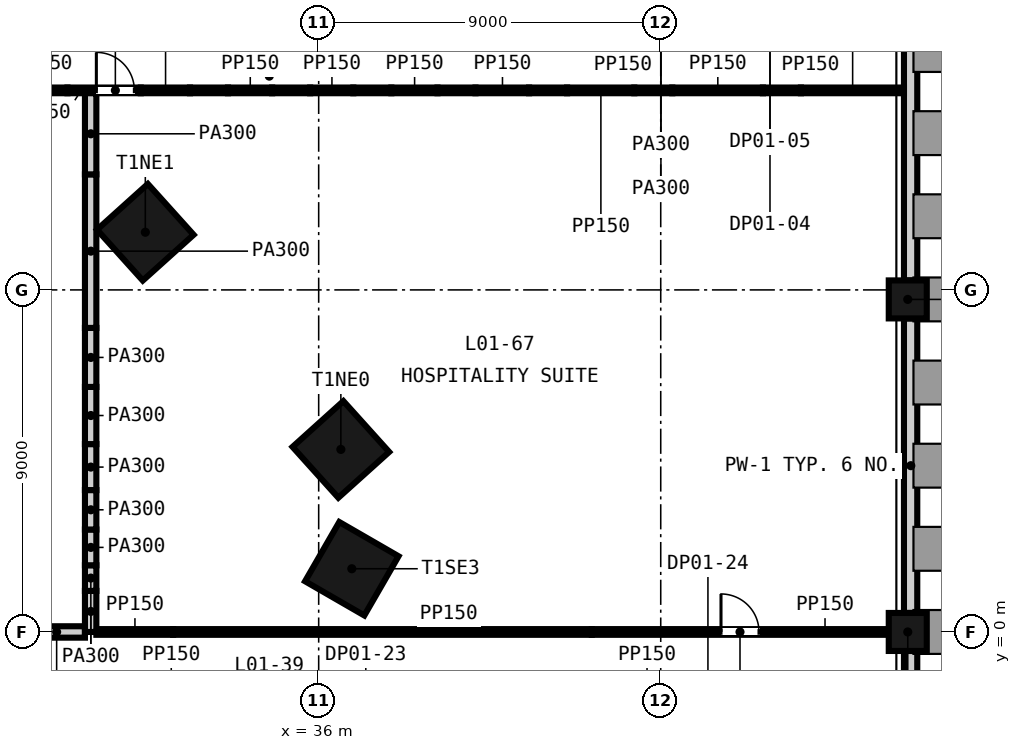
"""IFC4 building model, lengths in metres.
Left out: names, types, materials, properties, quantities, classifications, styles, units other than length and angle.
Written with IfcOpenShell. Run it as: python <this file> out.ifc"""

import sys

from ifc_helpers import new_model, si_unit, direction, frame, frame_2d, origin, origin_2d, place, context, subcontext, project, spatial, rectangle, extrude, element, fill, save


model = new_model("IFC4")
c1 = context("Model", 3, precision=1e-05, world=origin(), true_north=direction((0.0, 1.0)))
c2 = subcontext(c1, "Body", "Model", "MODEL_VIEW")
j1 = project(units=[si_unit("LENGTHUNIT", "METRE"), si_unit("PLANEANGLEUNIT", "RADIAN")], contexts=[c1])
p1 = place(None, origin())
s1 = spatial("IfcSite", under=j1, at=p1, CompositionType="ELEMENT")
p2 = place(p1, origin())
s2 = spatial("IfcBuilding", under=s1, at=p2, CompositionType="ELEMENT")
p3 = place(p2, frame((0.0, 0.0, 9.0)))
s3 = spatial("IfcBuildingStorey", under=s2, at=p3, CompositionType="ELEMENT", Elevation=9.0)
for number, where, z_axis, x_axis in (
    (1, (36.872, 1.663, -0.4), (0.0, 0.0, 1.0), (0.5, 0.866, 0.0)),
    (2, (36.584, 4.803, -0.4), (0.0, 0.0, 1.0), (-0.669, 0.743, 0.0)),
    (3, (31.438, 10.517, -0.4), (0.0, 0.0, 1.0), (-0.669, 0.743, 0.0)),
):
    element("IfcColumn", number, at=place(p3, frame(where, z_axis=z_axis, x_axis=x_axis)), inside=s3, PredefinedType="COLUMN", context=c2, shape_type="SweptSolid", body=[
        extrude(rectangle(XDim=1.8, YDim=1.8, at=origin_2d()), origin(), (0.0, 0.0, 1.0), 9.0),
    ])
for number, where, z_axis, x_axis in (
    (4, (51.5, 0.0, -0.4), (0.0, 0.0, 1.0), (0.0, 1.0, 0.0)),
    (5, (51.5, 8.75, -0.4), (0.0, 0.0, 1.0), (0.0, 1.0, 0.0)),
):
    element("IfcColumn", number, at=place(p3, frame(where, z_axis=z_axis, x_axis=x_axis)), inside=s3, PredefinedType="COLUMN", context=c2, shape_type="SweptSolid", body=[
        extrude(rectangle(XDim=1.0, YDim=1.0, at=origin_2d()), origin(), (0.0, 0.0, 1.0), 9.0),
    ])
p4 = place(p3, frame((51.575, -8.2, -0.4), z_axis=(0.0, 0.0, 1.0), x_axis=(0.0, 1.0, 0.0)))
e6 = element("IfcWall", 6, at=p4, inside=s3, PredefinedType="SOLIDWALL", context=c2, shape_type="SweptSolid", body=[
    extrude(rectangle(XDim=7.7, YDim=0.35, at=frame_2d((3.85, 0.0))), origin(), (0.0, 0.0, 1.0), 8.1),
])
for number, where, z_axis, x_axis in (
    (7, (51.575, 0.5, -0.4), (0.0, 0.0, 1.0), (0.0, 1.0, 0.0)),
    (8, (51.575, 9.25, -0.4), (0.0, 0.0, 1.0), (0.0, 1.0, 0.0)),
):
    element("IfcWall", number, at=place(p3, frame(where, z_axis=z_axis, x_axis=x_axis)), inside=s3, PredefinedType="SOLIDWALL", context=c2, shape_type="SweptSolid", body=[
        extrude(rectangle(XDim=7.75, YDim=0.35, at=frame_2d((3.875, 0.0))), origin(), (0.0, 0.0, 1.0), 8.1),
    ])
p5 = place(p3, frame((24.5, 0.0, 0.0), z_axis=(0.0, 0.0, 1.0), x_axis=(1.0, 0.0, 0.0)))
e9 = element("IfcWall", 9, at=p5, inside=s3, PredefinedType="PARTITIONING", context=c2, shape_type="SweptSolid", body=[
    extrude(rectangle(XDim=5.35, YDim=0.3, at=frame_2d((2.675, 0.0))), origin(), (0.0, 0.0, 1.0), 8.6),
])
p6 = place(p5, frame((1.4, 0.0, 0.0)))
e10 = element("IfcOpeningElement", 10, at=p6, cuts=e9, PredefinedType="OPENING", context=c2, shape_type="SweptSolid", body=[
    extrude(rectangle(XDim=2.4, YDim=2.4, at=frame_2d((1.2, 1.2))), frame((0.0, 0.16, 0.0), z_axis=(0.0, -1.0, 0.0), x_axis=(1.0, 0.0, 0.0)), (0.0, 0.0, 1.0), 0.32),
])
p7 = place(p3, frame((30.15, 0.0, 0.0), z_axis=(0.0, 0.0, 1.0), x_axis=(1.0, 0.0, 0.0)))
e11 = element("IfcWall", 11, at=p7, inside=s3, PredefinedType="PARTITIONING", context=c2, shape_type="SweptSolid", body=[
    extrude(rectangle(XDim=2.021, YDim=0.15, at=frame_2d((1.01, 0.0))), origin(), (0.0, 0.0, 1.0), 8.6),
])
p8 = place(p3, frame((32.171, 0.0, 0.0), z_axis=(0.0, 0.0, 1.0), x_axis=(1.0, 0.0, 0.0)))
e12 = element("IfcWall", 12, at=p8, inside=s3, PredefinedType="PARTITIONING", context=c2, shape_type="SweptSolid", body=[
    extrude(rectangle(XDim=11.015, YDim=0.15, at=frame_2d((5.508, 0.0))), origin(), (0.0, 0.0, 1.0), 7.6),
])
p9 = place(p3, frame((43.186, 0.0, 0.0), z_axis=(0.0, 0.0, 1.0), x_axis=(1.0, 0.0, 0.0)))
e13 = element("IfcWall", 13, at=p9, inside=s3, PredefinedType="PARTITIONING", context=c2, shape_type="SweptSolid", body=[
    extrude(rectangle(XDim=7.814, YDim=0.15, at=frame_2d((3.907, 0.0))), origin(), (0.0, 0.0, 1.0), 8.6),
])
p10 = place(p9, frame((3.4, 0.0, 0.0)))
e14 = element("IfcOpeningElement", 14, at=p10, cuts=e13, PredefinedType="OPENING", context=c2, shape_type="SweptSolid", body=[
    extrude(rectangle(XDim=1.0, YDim=2.1, at=frame_2d((0.5, 1.05))), frame((0.0, 0.085, 0.0), z_axis=(0.0, -1.0, 0.0), x_axis=(1.0, 0.0, 0.0)), (0.0, 0.0, 1.0), 0.17),
])
p11 = place(p3, frame((28.111, 14.25, 0.0), z_axis=(0.0, 0.0, 1.0), x_axis=(1.0, 0.0, 0.0)))
e15 = element("IfcWall", 15, at=p11, inside=s3, PredefinedType="PARTITIONING", context=c2, shape_type="SweptSolid", body=[
    extrude(rectangle(XDim=1.278, YDim=0.15, at=frame_2d((0.639, 0.0))), origin(), (0.0, 0.0, 1.0), 7.6),
])
p12 = place(p3, frame((29.389, 14.25, 0.0), z_axis=(0.0, 0.0, 1.0), x_axis=(1.0, 0.0, 0.0)))
e16 = element("IfcWall", 16, at=p12, inside=s3, PredefinedType="PARTITIONING", context=c2, shape_type="SweptSolid", body=[
    extrude(rectangle(XDim=1.929, YDim=0.15, at=frame_2d((0.965, 0.0))), origin(), (0.0, 0.0, 1.0), 7.511),
])
p13 = place(p12, frame((0.76, 0.0, 0.0)))
e17 = element("IfcOpeningElement", 17, at=p13, cuts=e16, PredefinedType="OPENING", context=c2, shape_type="SweptSolid", body=[
    extrude(rectangle(XDim=1.0, YDim=2.1, at=frame_2d((0.5, 1.05))), frame((0.0, 0.085, 0.0), z_axis=(0.0, -1.0, 0.0), x_axis=(1.0, 0.0, 0.0)), (0.0, 0.0, 1.0), 0.17),
])
p14 = place(p3, frame((31.319, 14.25, 0.0), z_axis=(0.0, 0.0, 1.0), x_axis=(1.0, 0.0, 0.0)))
e18 = element("IfcWall", 18, at=p14, inside=s3, PredefinedType="PARTITIONING", context=c2, shape_type="SweptSolid", body=[
    extrude(rectangle(XDim=1.295, YDim=0.15, at=frame_2d((0.648, 0.0))), origin(), (0.0, 0.0, 1.0), 8.6),
])
p15 = place(p3, frame((32.614, 14.25, 0.0), z_axis=(0.0, 0.0, 1.0), x_axis=(1.0, 0.0, 0.0)))
e19 = element("IfcWall", 19, at=p15, inside=s3, PredefinedType="PARTITIONING", context=c2, shape_type="SweptSolid", body=[
    extrude(rectangle(XDim=1.0, YDim=0.15, at=frame_2d((0.5, 0.0))), origin(), (0.0, 0.0, 1.0), 7.511),
])
p16 = place(p3, frame((33.614, 14.25, 0.0), z_axis=(0.0, 0.0, 1.0), x_axis=(1.0, 0.0, 0.0)))
e20 = element("IfcWall", 20, at=p16, inside=s3, PredefinedType="PARTITIONING", context=c2, shape_type="SweptSolid", body=[
    extrude(rectangle(XDim=1.162, YDim=0.15, at=frame_2d((0.581, 0.0))), origin(), (0.0, 0.0, 1.0), 8.6),
])
p17 = place(p3, frame((34.776, 14.25, 0.0), z_axis=(0.0, 0.0, 1.0), x_axis=(1.0, 0.0, 0.0)))
e21 = element("IfcWall", 21, at=p17, inside=s3, PredefinedType="PARTITIONING", context=c2, shape_type="SweptSolid", body=[
    extrude(rectangle(XDim=1.0, YDim=0.15, at=frame_2d((0.5, 0.0))), origin(), (0.0, 0.0, 1.0), 7.511),
])
p18 = place(p3, frame((35.776, 14.25, 0.0), z_axis=(0.0, 0.0, 1.0), x_axis=(1.0, 0.0, 0.0)))
e22 = element("IfcWall", 22, at=p18, inside=s3, PredefinedType="PARTITIONING", context=c2, shape_type="SweptSolid", body=[
    extrude(rectangle(XDim=1.136, YDim=0.15, at=frame_2d((0.568, 0.0))), origin(), (0.0, 0.0, 1.0), 8.6),
])
p19 = place(p3, frame((36.912, 14.25, 0.0), z_axis=(0.0, 0.0, 1.0), x_axis=(1.0, 0.0, 0.0)))
e23 = element("IfcWall", 23, at=p19, inside=s3, PredefinedType="PARTITIONING", context=c2, shape_type="SweptSolid", body=[
    extrude(rectangle(XDim=1.0, YDim=0.15, at=frame_2d((0.5, 0.0))), origin(), (0.0, 0.0, 1.0), 7.511),
])
p20 = place(p3, frame((37.912, 14.25, 0.0), z_axis=(0.0, 0.0, 1.0), x_axis=(1.0, 0.0, 0.0)))
e24 = element("IfcWall", 24, at=p20, inside=s3, PredefinedType="PARTITIONING", context=c2, shape_type="SweptSolid", body=[
    extrude(rectangle(XDim=1.214, YDim=0.15, at=frame_2d((0.607, 0.0))), origin(), (0.0, 0.0, 1.0), 8.6),
])
p21 = place(p3, frame((39.126, 14.25, 0.0), z_axis=(0.0, 0.0, 1.0), x_axis=(1.0, 0.0, 0.0)))
e25 = element("IfcWall", 25, at=p21, inside=s3, PredefinedType="PARTITIONING", context=c2, shape_type="SweptSolid", body=[
    extrude(rectangle(XDim=1.0, YDim=0.15, at=frame_2d((0.5, 0.0))), origin(), (0.0, 0.0, 1.0), 7.511),
])
p22 = place(p3, frame((40.126, 14.25, 0.0), z_axis=(0.0, 0.0, 1.0), x_axis=(1.0, 0.0, 0.0)))
e26 = element("IfcWall", 26, at=p22, inside=s3, PredefinedType="PARTITIONING", context=c2, shape_type="SweptSolid", body=[
    extrude(rectangle(XDim=1.41, YDim=0.15, at=frame_2d((0.705, 0.0))), origin(), (0.0, 0.0, 1.0), 8.6),
])
p23 = place(p3, frame((41.536, 14.25, 0.0), z_axis=(0.0, 0.0, 1.0), x_axis=(1.0, 0.0, 0.0)))
e27 = element("IfcWall", 27, at=p23, inside=s3, PredefinedType="PARTITIONING", context=c2, shape_type="SweptSolid", body=[
    extrude(rectangle(XDim=1.0, YDim=0.15, at=frame_2d((0.5, 0.0))), origin(), (0.0, 0.0, 1.0), 7.511),
])
p24 = place(p3, frame((42.536, 14.25, 0.0), z_axis=(0.0, 0.0, 1.0), x_axis=(1.0, 0.0, 0.0)))
e28 = element("IfcWall", 28, at=p24, inside=s3, PredefinedType="PARTITIONING", context=c2, shape_type="SweptSolid", body=[
    extrude(rectangle(XDim=1.769, YDim=0.15, at=frame_2d((0.884, 0.0))), origin(), (0.0, 0.0, 1.0), 8.6),
])
p25 = place(p3, frame((44.305, 14.25, 0.0), z_axis=(0.0, 0.0, 1.0), x_axis=(1.0, 0.0, 0.0)))
e29 = element("IfcWall", 29, at=p25, inside=s3, PredefinedType="PARTITIONING", context=c2, shape_type="SweptSolid", body=[
    extrude(rectangle(XDim=1.0, YDim=0.15, at=frame_2d((0.5, 0.0))), origin(), (0.0, 0.0, 1.0), 7.511),
])
p26 = place(p3, frame((45.305, 14.25, 0.0), z_axis=(0.0, 0.0, 1.0), x_axis=(1.0, 0.0, 0.0)))
e30 = element("IfcWall", 30, at=p26, inside=s3, PredefinedType="PARTITIONING", context=c2, shape_type="SweptSolid", body=[
    extrude(rectangle(XDim=2.384, YDim=0.15, at=frame_2d((1.192, 0.0))), origin(), (0.0, 0.0, 1.0), 8.6),
])
p27 = place(p3, frame((47.689, 14.25, 0.0), z_axis=(0.0, 0.0, 1.0), x_axis=(1.0, 0.0, 0.0)))
e31 = element("IfcWall", 31, at=p27, inside=s3, PredefinedType="PARTITIONING", context=c2, shape_type="SweptSolid", body=[
    extrude(rectangle(XDim=1.0, YDim=0.15, at=frame_2d((0.5, 0.0))), origin(), (0.0, 0.0, 1.0), 7.686),
])
p28 = place(p3, frame((48.689, 14.25, 0.0), z_axis=(0.0, 0.0, 1.0), x_axis=(1.0, 0.0, 0.0)))
e32 = element("IfcWall", 32, at=p28, inside=s3, PredefinedType="PARTITIONING", context=c2, shape_type="SweptSolid", body=[
    extrude(rectangle(XDim=2.711, YDim=0.15, at=frame_2d((1.355, 0.0))), origin(), (0.0, 0.0, 1.0), 8.6),
])
p29 = place(p3, frame((30.0, 0.0, 0.0), z_axis=(0.0, 0.0, 1.0), x_axis=(0.0, 1.0, 0.0)))
e33 = element("IfcWall", 33, at=p29, inside=s3, PredefinedType="PARTITIONING", context=c2, shape_type="SweptSolid", body=[
    extrude(rectangle(XDim=1.08, YDim=0.3, at=frame_2d((0.54, 0.0))), origin(), (0.0, 0.0, 1.0), 7.921),
])
p30 = place(p3, frame((30.0, 1.08, 0.0), z_axis=(0.0, 0.0, 1.0), x_axis=(0.0, 1.0, 0.0)))
e34 = element("IfcWall", 34, at=p30, inside=s3, PredefinedType="PARTITIONING", context=c2, shape_type="SweptSolid", body=[
    extrude(rectangle(XDim=0.674, YDim=0.3, at=frame_2d((0.337, 0.0))), origin(), (0.0, 0.0, 1.0), 7.921),
])
p31 = place(p3, frame((30.0, 1.755, 0.0), z_axis=(0.0, 0.0, 1.0), x_axis=(0.0, 1.0, 0.0)))
e35 = element("IfcWall", 35, at=p31, inside=s3, PredefinedType="PARTITIONING", context=c2, shape_type="SweptSolid", body=[
    extrude(rectangle(XDim=0.941, YDim=0.3, at=frame_2d((0.47, 0.0))), origin(), (0.0, 0.0, 1.0), 7.851),
])
p32 = place(p3, frame((30.0, 2.696, 0.0), z_axis=(0.0, 0.0, 1.0), x_axis=(0.0, 1.0, 0.0)))
e36 = element("IfcWall", 36, at=p32, inside=s3, PredefinedType="PARTITIONING", context=c2, shape_type="SweptSolid", body=[
    extrude(rectangle(XDim=1.038, YDim=0.3, at=frame_2d((0.519, 0.0))), origin(), (0.0, 0.0, 1.0), 7.851),
])
p33 = place(p3, frame((30.0, 3.733, 0.0), z_axis=(0.0, 0.0, 1.0), x_axis=(0.0, 1.0, 0.0)))
e37 = element("IfcWall", 37, at=p33, inside=s3, PredefinedType="PARTITIONING", context=c2, shape_type="SweptSolid", body=[
    extrude(rectangle(XDim=1.209, YDim=0.3, at=frame_2d((0.605, 0.0))), origin(), (0.0, 0.0, 1.0), 7.851),
])
p34 = place(p3, frame((30.0, 4.943, 0.0), z_axis=(0.0, 0.0, 1.0), x_axis=(0.0, 1.0, 0.0)))
e38 = element("IfcWall", 38, at=p34, inside=s3, PredefinedType="PARTITIONING", context=c2, shape_type="SweptSolid", body=[
    extrude(rectangle(XDim=1.504, YDim=0.3, at=frame_2d((0.752, 0.0))), origin(), (0.0, 0.0, 1.0), 7.921),
])
p35 = place(p3, frame((30.0, 6.447, 0.0), z_axis=(0.0, 0.0, 1.0), x_axis=(0.0, 1.0, 0.0)))
e39 = element("IfcWall", 39, at=p35, inside=s3, PredefinedType="PARTITIONING", context=c2, shape_type="SweptSolid", body=[
    extrude(rectangle(XDim=1.553, YDim=0.3, at=frame_2d((0.776, 0.0))), origin(), (0.0, 0.0, 1.0), 7.994),
])
p36 = place(p3, frame((30.0, 8.0, 0.0), z_axis=(0.0, 0.0, 1.0), x_axis=(0.0, 1.0, 0.0)))
e40 = element("IfcWall", 40, at=p36, inside=s3, PredefinedType="PARTITIONING", context=c2, shape_type="SweptSolid", body=[
    extrude(rectangle(XDim=4.04, YDim=0.3, at=frame_2d((2.02, 0.0))), origin(), (0.0, 0.0, 1.0), 8.6),
])
p37 = place(p3, frame((30.0, 12.04, 0.0), z_axis=(0.0, 0.0, 1.0), x_axis=(0.0, 1.0, 0.0)))
e41 = element("IfcWall", 41, at=p37, inside=s3, PredefinedType="PARTITIONING", context=c2, shape_type="SweptSolid", body=[
    extrude(rectangle(XDim=2.135, YDim=0.3, at=frame_2d((1.067, 0.0))), origin(), (0.0, 0.0, 1.0), 7.6),
])
p38 = place(p10, origin())
e42 = element("IfcDoor", 42, at=p38, inside=s3, OperationType="SINGLE_SWING_LEFT", PredefinedType="DOOR", context=c2, shape_type="SweptSolid", body=[
    extrude(rectangle(XDim=1.0, YDim=2.1, at=frame_2d((0.5, 1.05))), frame((0.0, 0.025, 0.0), z_axis=(0.0, -1.0, 0.0), x_axis=(1.0, 0.0, 0.0)), (0.0, 0.0, 1.0), 0.05),
])
fill(e14, e42)
p39 = place(p13, origin())
e43 = element("IfcDoor", 43, at=p39, inside=s3, OperationType="SINGLE_SWING_LEFT", PredefinedType="DOOR", context=c2, shape_type="SweptSolid", body=[
    extrude(rectangle(XDim=1.0, YDim=2.1, at=frame_2d((0.5, 1.05))), frame((0.0, 0.025, 0.0), z_axis=(0.0, -1.0, 0.0), x_axis=(1.0, 0.0, 0.0)), (0.0, 0.0, 1.0), 0.05),
])
fill(e17, e43)
save(model, sys.argv[1])
